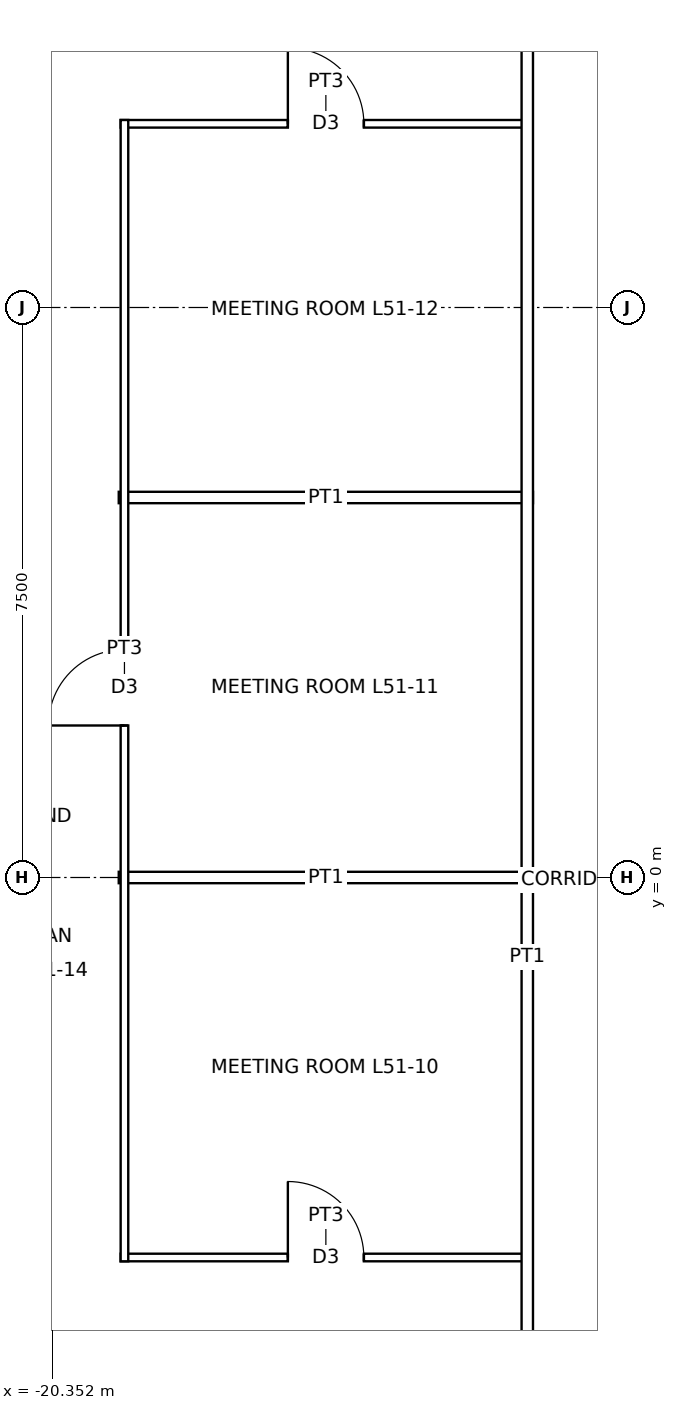
"""IFC4 building model, lengths in metres.
Left out: names, types, materials, properties, quantities, classifications, styles, units other than length and angle.
Written with IfcOpenShell. Run it as: python <this file> out.ifc"""

import sys

from ifc_helpers import new_model, si_unit, direction, frame, frame_2d, origin, place, context, subcontext, project, spatial, rectangle, extrude, element, fill, save


model = new_model("IFC4")
c1 = context("Model", 3, precision=1e-05, world=origin(), true_north=direction((0.0, 1.0)))
c2 = subcontext(c1, "Body", "Model", "MODEL_VIEW")
j1 = project(units=[si_unit("LENGTHUNIT", "METRE"), si_unit("PLANEANGLEUNIT", "RADIAN")], contexts=[c1])
p1 = place(None, origin())
s1 = spatial("IfcSite", under=j1, at=p1, CompositionType="ELEMENT")
p2 = place(p1, origin())
s2 = spatial("IfcBuilding", under=s1, at=p2, CompositionType="ELEMENT")
p3 = place(p2, frame((0.0, 0.0, 237.9)))
s3 = spatial("IfcBuildingStorey", under=s2, at=p3, CompositionType="ELEMENT", Elevation=237.9)
p4 = place(p3, frame((-19.45, -5.0, 0.0), z_axis=(0.0, 0.0, 1.0), x_axis=(1.0, 0.0, 0.0)))
e1 = element("IfcWall", 1, at=p4, inside=s3, PredefinedType="PARTITIONING", context=c2, shape_type="SweptSolid", body=[
    extrude(rectangle(XDim=5.4, YDim=0.1, at=frame_2d((2.7, 0.0))), origin(), (0.0, 0.0, 1.0), 3.85),
])
p5 = place(p4, frame((2.2, 0.0, 0.0)))
e2 = element("IfcOpeningElement", 2, at=p5, cuts=e1, PredefinedType="OPENING", context=c2, shape_type="SweptSolid", body=[
    extrude(rectangle(XDim=1.0, YDim=2.1, at=frame_2d((0.5, 1.05))), frame((0.0, 0.06, 0.0), z_axis=(0.0, -1.0, 0.0), x_axis=(1.0, 0.0, 0.0)), (0.0, 0.0, 1.0), 0.12),
])
p6 = place(p3, frame((-19.475, 0.0, 0.0), z_axis=(0.0, 0.0, 1.0), x_axis=(1.0, 0.0, 0.0)))
e3 = element("IfcWall", 3, at=p6, inside=s3, PredefinedType="PARTITIONING", context=c2, shape_type="SweptSolid", body=[
    extrude(rectangle(XDim=5.45, YDim=0.15, at=frame_2d((2.725, 0.0))), origin(), (0.0, 0.0, 1.0), 3.238),
])
p7 = place(p3, frame((-19.475, 5.0, 0.0), z_axis=(0.0, 0.0, 1.0), x_axis=(1.0, 0.0, 0.0)))
e4 = element("IfcWall", 4, at=p7, inside=s3, PredefinedType="PARTITIONING", context=c2, shape_type="SweptSolid", body=[
    extrude(rectangle(XDim=5.45, YDim=0.15, at=frame_2d((2.725, 0.0))), origin(), (0.0, 0.0, 1.0), 3.85),
])
p8 = place(p3, frame((-19.45, 9.917, 0.0), z_axis=(0.0, 0.0, 1.0), x_axis=(1.0, 0.0, 0.0)))
e5 = element("IfcWall", 5, at=p8, inside=s3, PredefinedType="PARTITIONING", context=c2, shape_type="SweptSolid", body=[
    extrude(rectangle(XDim=5.4, YDim=0.1, at=frame_2d((2.7, 0.0))), origin(), (0.0, 0.0, 1.0), 3.85),
])
p9 = place(p8, frame((2.2, 0.0, 0.0)))
e6 = element("IfcOpeningElement", 6, at=p9, cuts=e5, PredefinedType="OPENING", context=c2, shape_type="SweptSolid", body=[
    extrude(rectangle(XDim=1.0, YDim=2.1, at=frame_2d((0.5, 1.05))), frame((0.0, 0.06, 0.0), z_axis=(0.0, -1.0, 0.0), x_axis=(1.0, 0.0, 0.0)), (0.0, 0.0, 1.0), 0.12),
])
p10 = place(p3, frame((-19.4, -5.05, 0.0), z_axis=(0.0, 0.0, 1.0), x_axis=(0.0, 1.0, 0.0)))
e7 = element("IfcWall", 7, at=p10, inside=s3, PredefinedType="PARTITIONING", context=c2, shape_type="SweptSolid", body=[
    extrude(rectangle(XDim=15.017, YDim=0.1, at=frame_2d((7.509, 0.0))), origin(), (0.0, 0.0, 1.0), 3.85),
])
p11 = place(p10, frame((7.05, 0.0, 0.0)))
e8 = element("IfcOpeningElement", 8, at=p11, cuts=e7, PredefinedType="OPENING", context=c2, shape_type="SweptSolid", body=[
    extrude(rectangle(XDim=1.0, YDim=2.1, at=frame_2d((0.5, 1.05))), frame((0.0, 0.06, 0.0), z_axis=(0.0, -1.0, 0.0), x_axis=(1.0, 0.0, 0.0)), (0.0, 0.0, 1.0), 0.12),
])
p12 = place(p3, frame((-14.1, -14.175, 0.0), z_axis=(0.0, 0.0, 1.0), x_axis=(0.0, 1.0, 0.0)))
e9 = element("IfcWall", 9, at=p12, inside=s3, PredefinedType="PARTITIONING", context=c2, shape_type="SweptSolid", body=[
    extrude(rectangle(XDim=26.25, YDim=0.15, at=frame_2d((13.125, 0.0))), origin(), (0.0, 0.0, 1.0), 3.85),
])
p13 = place(p12, frame((4.125, 0.0, 0.0)))
e10 = element("IfcOpeningElement", 10, at=p13, cuts=e9, PredefinedType="OPENING", context=c2, shape_type="SweptSolid", body=[
    extrude(rectangle(XDim=1.0, YDim=2.4, at=frame_2d((0.5, 1.2))), frame((0.0, 0.085, 0.0), z_axis=(0.0, -1.0, 0.0), x_axis=(1.0, 0.0, 0.0)), (0.0, 0.0, 1.0), 0.17),
])
p14 = place(p5, origin())
e11 = element("IfcDoor", 11, at=p14, inside=s3, OperationType="SINGLE_SWING_LEFT", PredefinedType="DOOR", context=c2, shape_type="SweptSolid", body=[
    extrude(rectangle(XDim=1.0, YDim=2.1, at=frame_2d((0.5, 1.05))), frame((0.0, 0.025, 0.0), z_axis=(0.0, -1.0, 0.0), x_axis=(1.0, 0.0, 0.0)), (0.0, 0.0, 1.0), 0.05),
])
fill(e2, e11)
p15 = place(p11, origin())
e12 = element("IfcDoor", 12, at=p15, inside=s3, OperationType="SINGLE_SWING_LEFT", PredefinedType="DOOR", context=c2, shape_type="SweptSolid", body=[
    extrude(rectangle(XDim=1.0, YDim=2.1, at=frame_2d((0.5, 1.05))), frame((0.0, 0.025, 0.0), z_axis=(0.0, -1.0, 0.0), x_axis=(1.0, 0.0, 0.0)), (0.0, 0.0, 1.0), 0.05),
])
fill(e8, e12)
p16 = place(p9, origin())
e13 = element("IfcDoor", 13, at=p16, inside=s3, OperationType="SINGLE_SWING_LEFT", PredefinedType="DOOR", context=c2, shape_type="SweptSolid", body=[
    extrude(rectangle(XDim=1.0, YDim=2.1, at=frame_2d((0.5, 1.05))), frame((0.0, 0.025, 0.0), z_axis=(0.0, -1.0, 0.0), x_axis=(1.0, 0.0, 0.0)), (0.0, 0.0, 1.0), 0.05),
])
fill(e6, e13)
save(model, sys.argv[1])
